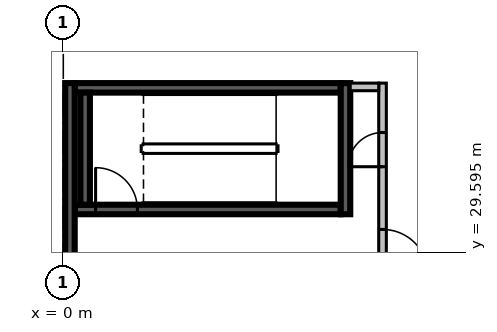
"""IFC4 building model, lengths in metres.
Left out: names, types, materials, properties, quantities, classifications, styles, units other than length and angle.
Written with IfcOpenShell. Run it as: python <this file> out.ifc"""

import sys

from ifc_helpers import new_model, si_unit, direction, frame, frame_2d, origin, place, context, subcontext, project, spatial, rectangle, extrude, source, transform, mapped, element, fill, save


model = new_model("IFC4")
c1 = context("Model", 3, precision=1e-05, world=origin(), true_north=direction((0.0, 1.0)))
c2 = subcontext(c1, "Body", "Model", "MODEL_VIEW")
j1 = project(units=[si_unit("LENGTHUNIT", "METRE"), si_unit("PLANEANGLEUNIT", "RADIAN")], contexts=[c1])
p1 = place(None, origin())
s1 = spatial("IfcSite", under=j1, at=p1, CompositionType="ELEMENT")
p2 = place(p1, origin())
s2 = spatial("IfcBuilding", under=s1, at=p2, CompositionType="ELEMENT")
p3 = place(p2, frame((0.0, 0.0, 12.9)))
s3 = spatial("IfcBuildingStorey", under=s2, at=p3, CompositionType="ELEMENT", Elevation=12.9)
m1 = source(origin(), c2, "Body", "SweptSolid", [
    extrude(rectangle(XDim=7.0, YDim=0.25, at=frame_2d((3.5, 0.0))), origin(), (0.0, 0.0, 1.0), 4.8),
])
p4 = place(p3, frame((0.3, 30.725, 0.0), z_axis=(0.0, 0.0, 1.0), x_axis=(1.0, 0.0, 0.0)))
e1 = element("IfcWall", 1, at=p4, inside=s3, PredefinedType="SOLIDWALL", context=c2, shape_type="MappedRepresentation", body=[
    mapped(m1, transform((0.0, 0.0, 0.0), scale=1.0)),
])
m2 = source(origin(), c2, "Body", "SweptSolid", [
    extrude(rectangle(XDim=1.1, YDim=2.1, at=frame_2d((0.55, 1.05))), frame((0.0, 0.135, 0.0), z_axis=(0.0, -1.0, 0.0), x_axis=(1.0, 0.0, 0.0)), (0.0, 0.0, 1.0), 0.27),
])
p5 = place(p4, frame((0.55, 0.0, 0.0)))
e2 = element("IfcOpeningElement", 2, at=p5, cuts=e1, PredefinedType="OPENING", context=c2, shape_type="MappedRepresentation", body=[
    mapped(m2, transform((0.0, 0.0, 0.0), scale=1.0)),
])
p6 = place(p3, frame((0.3, 33.925, 0.0), z_axis=(0.0, 0.0, 1.0), x_axis=(1.0, 0.0, 0.0)))
e3 = element("IfcWall", 3, at=p6, inside=s3, PredefinedType="SOLIDWALL", context=c2, shape_type="MappedRepresentation", body=[
    mapped(m1, transform((0.0, 0.0, 0.0), scale=1.0)),
])
m3 = source(origin(), c2, "Body", "SweptSolid", [
    extrude(rectangle(XDim=3.45, YDim=0.25, at=frame_2d((1.725, 0.0))), origin(), (0.0, 0.0, 1.0), 4.8),
])
p7 = place(p3, frame((7.425, 30.6, 0.0), z_axis=(0.0, 0.0, 1.0), x_axis=(0.0, 1.0, 0.0)))
e4 = element("IfcWall", 4, at=p7, inside=s3, PredefinedType="SOLIDWALL", context=c2, shape_type="MappedRepresentation", body=[
    mapped(m3, transform((0.0, 0.0, 0.0), scale=1.0)),
])
m4 = source(origin(), c2, "Body", "SweptSolid", [
    extrude(rectangle(XDim=2.95, YDim=0.25, at=frame_2d((1.475, 0.0))), origin(), (0.0, 0.0, 1.0), 4.8),
])
p8 = place(p3, frame((0.575, 30.85, 0.0), z_axis=(0.0, 0.0, 1.0), x_axis=(0.0, 1.0, 0.0)))
e5 = element("IfcWall", 5, at=p8, inside=s3, PredefinedType="SOLIDWALL", context=c2, shape_type="MappedRepresentation", body=[
    mapped(m4, transform((0.0, 0.0, 0.0), scale=1.0)),
])
m5 = source(origin(), c2, "Body", "SweptSolid", [
    extrude(rectangle(XDim=5.45, YDim=0.2, at=frame_2d((2.725, 0.0))), origin(), (0.0, 0.0, 1.0), 4.8),
])
p9 = place(p3, frame((8.4, 28.6, 0.0), z_axis=(0.0, 0.0, 1.0), x_axis=(0.0, 1.0, 0.0)))
e6 = element("IfcWall", 6, at=p9, inside=s3, PredefinedType="PARTITIONING", context=c2, shape_type="MappedRepresentation", body=[
    mapped(m5, transform((0.0, 0.0, 0.0), scale=1.0)),
])
m6 = source(origin(), c2, "Body", "SweptSolid", [
    extrude(rectangle(XDim=1.2, YDim=2.1, at=frame_2d((0.6, 1.05))), frame((0.0, 0.11, 0.0), z_axis=(0.0, -1.0, 0.0), x_axis=(1.0, 0.0, 0.0)), (0.0, 0.0, 1.0), 0.22),
])
p10 = place(p9, frame((0.4, 0.0, 0.0)))
e7 = element("IfcOpeningElement", 7, at=p10, cuts=e6, PredefinedType="OPENING", context=c2, shape_type="MappedRepresentation", body=[
    mapped(m6, transform((0.0, 0.0, 0.0), scale=1.0)),
])
m7 = source(origin(), c2, "Body", "SweptSolid", [
    extrude(rectangle(XDim=0.9, YDim=2.1, at=frame_2d((0.45, 1.05))), frame((0.0, 0.11, 0.0), z_axis=(0.0, -1.0, 0.0), x_axis=(1.0, 0.0, 0.0)), (0.0, 0.0, 1.0), 0.22),
])
p11 = place(p9, frame((3.25, 0.0, 0.0)))
e8 = element("IfcOpeningElement", 8, at=p11, cuts=e6, PredefinedType="OPENING", context=c2, shape_type="MappedRepresentation", body=[
    mapped(m7, transform((0.0, 0.0, 0.0), scale=1.0)),
])
m8 = source(origin(), c2, "Body", "SweptSolid", [
    extrude(rectangle(XDim=0.75, YDim=0.2, at=frame_2d((0.375, 0.0))), origin(), (0.0, 0.0, 1.0), 4.8),
])
p12 = place(p3, frame((7.55, 33.95, 0.0), z_axis=(0.0, 0.0, 1.0), x_axis=(1.0, 0.0, 0.0)))
e9 = element("IfcWall", 9, at=p12, inside=s3, PredefinedType="PARTITIONING", context=c2, shape_type="MappedRepresentation", body=[
    mapped(m8, transform((0.0, 0.0, 0.0), scale=1.0)),
])
m9 = source(origin(), c2, "Body", "SweptSolid", [
    extrude(rectangle(XDim=5.45, YDim=0.25, at=frame_2d((2.725, 0.0))), origin(), (0.0, 0.0, 1.0), 4.8),
])
p13 = place(p3, frame((0.175, 28.6, 0.0), z_axis=(0.0, 0.0, 1.0), x_axis=(0.0, 1.0, 0.0)))
e10 = element("IfcWall", 10, at=p13, inside=s3, PredefinedType="SOLIDWALL", context=c2, shape_type="MappedRepresentation", body=[
    mapped(m9, transform((0.0, 0.0, 0.0), scale=1.0)),
])
m10 = source(origin(), c2, "Body", "SweptSolid", [
    extrude(rectangle(XDim=1.1, YDim=2.1, at=frame_2d((0.55, 1.05))), frame((0.0, 0.025, 0.0), z_axis=(0.0, -1.0, 0.0), x_axis=(1.0, 0.0, 0.0)), (0.0, 0.0, 1.0), 0.05),
])
p14 = place(p5, origin())
e11 = element("IfcDoor", 11, at=p14, inside=s3, OperationType="SINGLE_SWING_LEFT", PredefinedType="DOOR", context=c2, shape_type="MappedRepresentation", body=[
    mapped(m10, transform((0.0, 0.0, 0.0), scale=1.0)),
])
fill(e2, e11)
m11 = source(origin(), c2, "Body", "SweptSolid", [
    extrude(rectangle(XDim=1.2, YDim=2.1, at=frame_2d((0.6, 1.05))), frame((0.0, 0.025, 0.0), z_axis=(0.0, -1.0, 0.0), x_axis=(1.0, 0.0, 0.0)), (0.0, 0.0, 1.0), 0.05),
])
p15 = place(p10, origin())
e12 = element("IfcDoor", 12, at=p15, inside=s3, OperationType="SINGLE_SWING_RIGHT", PredefinedType="DOOR", context=c2, shape_type="MappedRepresentation", body=[
    mapped(m11, transform((0.0, 0.0, 0.0), scale=1.0)),
])
fill(e7, e12)
m12 = source(origin(), c2, "Body", "SweptSolid", [
    extrude(rectangle(XDim=0.9, YDim=2.1, at=frame_2d((0.45, 1.05))), frame((0.0, 0.025, 0.0), z_axis=(0.0, -1.0, 0.0), x_axis=(1.0, 0.0, 0.0)), (0.0, 0.0, 1.0), 0.05),
])
p16 = place(p11, origin())
e13 = element("IfcDoor", 13, at=p16, inside=s3, OperationType="SINGLE_SWING_LEFT", PredefinedType="DOOR", context=c2, shape_type="MappedRepresentation", body=[
    mapped(m12, transform((0.0, 0.0, 0.0), scale=1.0)),
])
fill(e8, e13)
save(model, sys.argv[1])
